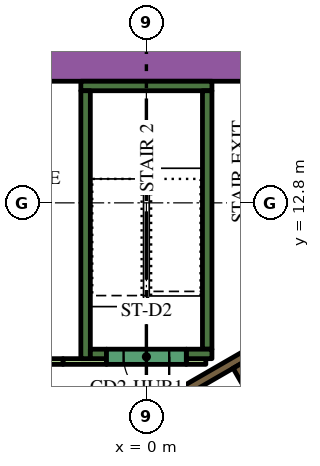
"""IFC4 building model, lengths in metres.
Left out: names, types, materials, properties, quantities, classifications, styles, units other than length and angle.
Written with IfcOpenShell. Run it as: python <this file> out.ifc"""

import sys

from ifc_helpers import new_model, si_unit, direction, frame, frame_2d, origin, place, context, subcontext, project, spatial, polyline, rectangle, outline, extrude, element, fill, save


model = new_model("IFC4")
c1 = context("Model", 3, precision=1e-05, world=origin(), true_north=direction((0.0, 1.0)))
c2 = subcontext(c1, "Body", "Model", "MODEL_VIEW")
j1 = project(units=[si_unit("LENGTHUNIT", "METRE"), si_unit("PLANEANGLEUNIT", "RADIAN")], contexts=[c1])
p1 = place(None, origin())
s1 = spatial("IfcSite", under=j1, at=p1, CompositionType="ELEMENT")
p2 = place(p1, origin())
s2 = spatial("IfcBuilding", under=s1, at=p2, CompositionType="ELEMENT")
p3 = place(p2, frame((0.0, 0.0, 43.2)))
s3 = spatial("IfcBuildingStorey", under=s2, at=p3, CompositionType="ELEMENT", Elevation=43.2)
p4 = place(p3, frame((-4.224, 16.45, 0.0), z_axis=(0.0, 0.0, 1.0), x_axis=(1.0, 0.0, 0.0)))
e1 = element("IfcWall", 1, at=p4, inside=s3, PredefinedType="SOLIDWALL", context=c2, shape_type="SweptSolid", body=[
    extrude(rectangle(XDim=9.488, YDim=0.9, at=frame_2d((4.744, 0.0))), origin(), (0.0, 0.0, 1.0), 3.9),
])
p5 = place(p3, frame((-1.725, 15.875, 0.0), z_axis=(0.0, 0.0, 1.0), x_axis=(1.0, 0.0, 0.0)))
e2 = element("IfcWall", 2, at=p5, inside=s3, PredefinedType="SOLIDWALL", context=c2, shape_type="SweptSolid", body=[
    extrude(rectangle(XDim=3.45, YDim=0.25, at=frame_2d((1.725, 0.0))), origin(), (0.0, 0.0, 1.0), 3.9),
])
p6 = place(p3, frame((1.6, 8.95, 0.0), z_axis=(0.0, 0.0, 1.0), x_axis=(0.0, 1.0, 0.0)))
e3 = element("IfcWall", 3, at=p6, inside=s3, PredefinedType="SOLIDWALL", context=c2, shape_type="SweptSolid", body=[
    extrude(rectangle(XDim=6.8, YDim=0.25, at=frame_2d((3.4, 0.0))), origin(), (0.0, 0.0, 1.0), 3.9),
])
p7 = place(p3, frame((1.05, 8.825, 0.0), z_axis=(0.0, 0.0, 1.0), x_axis=(1.0, 0.0, 0.0)))
e4 = element("IfcWall", 4, at=p7, inside=s3, PredefinedType="SOLIDWALL", context=c2, shape_type="SweptSolid", body=[
    extrude(rectangle(XDim=0.675, YDim=0.25, at=frame_2d((0.337, 0.0))), origin(), (0.0, 0.0, 1.0), 3.9),
])
p8 = place(p3, frame((-1.6, 8.7, 0.0), z_axis=(0.0, 0.0, 1.0), x_axis=(0.0, 1.0, 0.0)))
e5 = element("IfcWall", 5, at=p8, inside=s3, PredefinedType="SOLIDWALL", context=c2, shape_type="SweptSolid", body=[
    extrude(rectangle(XDim=7.05, YDim=0.25, at=frame_2d((3.525, 0.0))), origin(), (0.0, 0.0, 1.0), 3.9),
])
p9 = place(p3, frame((-1.475, 8.825, 0.0), z_axis=(0.0, 0.0, 1.0), x_axis=(1.0, 0.0, 0.0)))
e6 = element("IfcWall", 6, at=p9, inside=s3, PredefinedType="SOLIDWALL", context=c2, shape_type="SweptSolid", body=[
    extrude(rectangle(XDim=0.425, YDim=0.25, at=frame_2d((0.212, 0.0))), origin(), (0.0, 0.0, 1.0), 3.9),
])
p10 = place(p3, origin())
e7 = element("IfcWall", 7, at=p10, inside=s3, PredefinedType="SOLIDWALL", context=c2, shape_type="SweptSolid", body=[
    extrude(outline(polyline([(2.776, 8.733), (2.499, 8.573), (2.498, 8.573), (2.498, 8.573), (2.282, 8.448), (2.282, 8.448), (0.377, 7.348), (0.16, 7.223), (0.035, 7.439), (3.032, 9.169), (3.03, 9.152), (3.03, 9.133), (3.031, 9.113), (3.035, 9.094), (3.04, 9.075), (3.047, 9.057), (3.056, 9.039), (3.119, 8.931), (2.776, 8.733)])), origin(), (0.0, 0.0, 1.0), 3.9),
])
p11 = place(p3, frame((-2.195, 8.625, 0.0), z_axis=(0.0, 0.0, 1.0), x_axis=(1.0, 0.0, 0.0)))
e8 = element("IfcWall", 8, at=p11, inside=s3, PredefinedType="PARTITIONING", context=c2, shape_type="SweptSolid", body=[
    extrude(rectangle(XDim=1.145, YDim=0.15, at=frame_2d((0.573, 0.0))), origin(), (0.0, 0.0, 1.0), 2.75),
])
p12 = place(p3, frame((1.05, 8.625, 0.0), z_axis=(0.0, 0.0, 1.0), x_axis=(1.0, 0.0, 0.0)))
e9 = element("IfcWall", 9, at=p12, inside=s3, PredefinedType="PARTITIONING", context=c2, shape_type="SweptSolid", body=[
    extrude(rectangle(XDim=0.514, YDim=0.15, at=frame_2d((0.257, 0.0))), origin(), (0.0, 0.0, 1.0), 2.75),
])
p13 = place(p3, frame((8.565, -2.185, 0.0), z_axis=(0.0, 0.0, 1.0), x_axis=(-0.499997954832, 0.866026584559, 0.0)))
e10 = element("IfcWall", 10, at=p13, inside=s3, PredefinedType="SOLIDWALL", context=c2, shape_type="SweptSolid", body=[
    extrude(rectangle(XDim=12.35, YDim=0.25, at=frame_2d((6.175, 0.0))), origin(), (0.0, 0.0, 1.0), 3.9),
])
p14 = place(p13, frame((5.725, 0.0, 0.0)))
e11 = element("IfcOpeningElement", 11, at=p14, cuts=e10, PredefinedType="OPENING", context=c2, shape_type="SweptSolid", body=[
    extrude(rectangle(XDim=0.9, YDim=2.1, at=frame_2d((0.45, 1.05))), frame((0.0, 0.135, 0.0), z_axis=(0.0, -1.0, 0.0), x_axis=(1.0, 0.0, 0.0)), (0.0, 0.0, 1.0), 0.27),
])
p15 = place(p3, frame((1.05, 8.75, 0.0), z_axis=(0.0, 0.0, 1.0), x_axis=(-1.0, 0.0, 0.0)))
e12 = element("IfcWall", 12, at=p15, inside=s3, PredefinedType="SOLIDWALL", context=c2, shape_type="SweptSolid", body=[
    extrude(rectangle(XDim=2.1, YDim=0.4, at=frame_2d((1.05, 0.0))), origin(), (0.0, 0.0, 1.0), 3.9),
])
p16 = place(p15, frame((0.45, 0.0, 0.0)))
e13 = element("IfcOpeningElement", 13, at=p16, cuts=e12, PredefinedType="OPENING", context=c2, shape_type="SweptSolid", body=[
    extrude(rectangle(XDim=1.2, YDim=2.1, at=frame_2d((0.6, 1.05))), frame((0.0, 0.21, 0.0), z_axis=(0.0, -1.0, 0.0), x_axis=(1.0, 0.0, 0.0)), (0.0, 0.0, 1.0), 0.42),
])
p17 = place(p3, frame((-2.195, 8.625, 0.0), z_axis=(0.0, 0.0, 1.0), x_axis=(-1.0, 0.0, 0.0)))
e14 = element("IfcWall", 14, at=p17, inside=s3, PredefinedType="PARTITIONING", context=c2, shape_type="SweptSolid", body=[
    extrude(rectangle(XDim=1.8, YDim=0.15, at=frame_2d((0.9, 0.0))), origin(), (0.0, 0.0, 1.0), 2.75),
])
p18 = place(p17, frame((0.45, 0.0, 0.0)))
e15 = element("IfcOpeningElement", 15, at=p18, cuts=e14, PredefinedType="OPENING", context=c2, shape_type="SweptSolid", body=[
    extrude(rectangle(XDim=0.9, YDim=2.1, at=frame_2d((0.45, 1.05))), frame((0.0, 0.085, 0.0), z_axis=(0.0, -1.0, 0.0), x_axis=(1.0, 0.0, 0.0)), (0.0, 0.0, 1.0), 0.17),
])
p19 = place(p16, origin())
e16 = element("IfcDoor", 16, at=p19, inside=s3, OperationType="SINGLE_SWING_LEFT", PredefinedType="DOOR", context=c2, shape_type="SweptSolid", body=[
    extrude(rectangle(XDim=1.2, YDim=2.1, at=frame_2d((0.6, 1.05))), frame((0.0, 0.025, 0.0), z_axis=(0.0, -1.0, 0.0), x_axis=(1.0, 0.0, 0.0)), (0.0, 0.0, 1.0), 0.05),
])
fill(e13, e16)
save(model, sys.argv[1])
